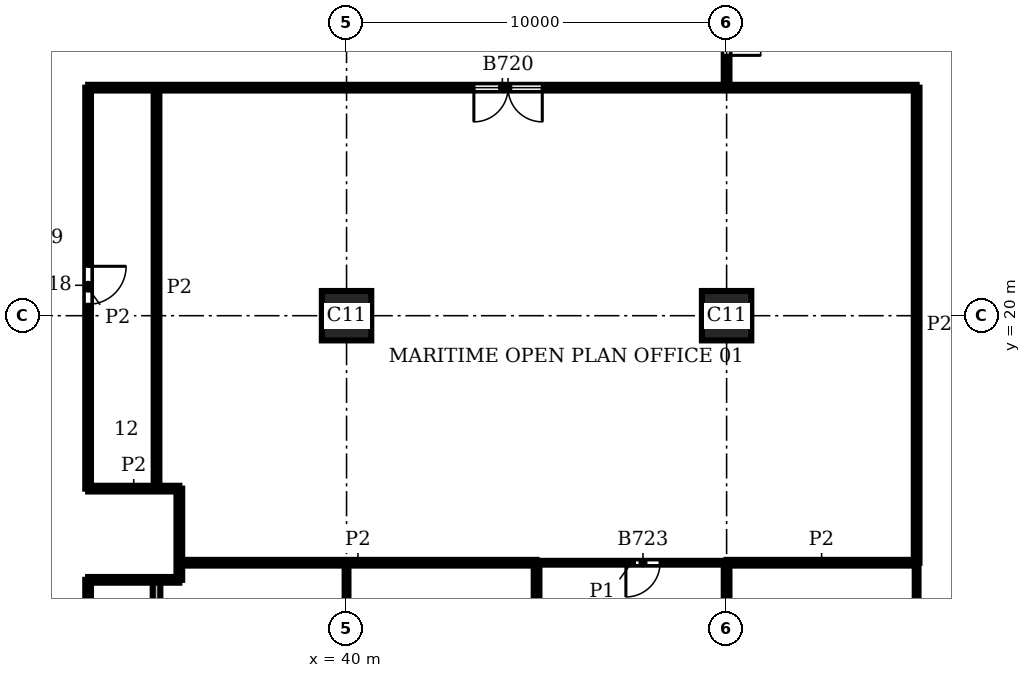
"""IFC4 building model, lengths in metres.
Left out: names, types, materials, properties, quantities, classifications, styles, units other than length and angle.
Written with IfcOpenShell. Run it as: python <this file> out.ifc"""

import sys

from ifc_helpers import new_model, si_unit, direction, frame, frame_2d, origin, origin_2d, place, context, subcontext, project, spatial, rectangle, extrude, element, fill, save


model = new_model("IFC4")
c1 = context("Model", 3, precision=1e-05, world=origin(), true_north=direction((0.0, 1.0)))
c2 = subcontext(c1, "Body", "Model", "MODEL_VIEW")
j1 = project(units=[si_unit("LENGTHUNIT", "METRE"), si_unit("PLANEANGLEUNIT", "RADIAN")], contexts=[c1])
p1 = place(None, origin())
s1 = spatial("IfcSite", under=j1, at=p1, CompositionType="ELEMENT")
p2 = place(p1, origin())
s2 = spatial("IfcBuilding", under=s1, at=p2, CompositionType="ELEMENT")
p3 = place(p2, frame((0.0, 0.0, 201.9)))
s3 = spatial("IfcBuildingStorey", under=s2, at=p3, CompositionType="ELEMENT", Elevation=201.9)
for number, where, z_axis, x_axis in (
    (1, (40.0, 20.0, 0.0), (0.0, 0.0, 1.0), (1.0, 0.0, 0.0)),
    (2, (50.0, 20.0, 0.0), (0.0, 0.0, 1.0), (1.0, 0.0, 0.0)),
):
    element("IfcColumn", number, at=place(p3, frame(where, z_axis=z_axis, x_axis=x_axis)), inside=s3, PredefinedType="COLUMN", context=c2, shape_type="SweptSolid", body=[
        extrude(rectangle(XDim=1.3, YDim=1.3, at=origin_2d()), origin(), (0.0, 0.0, 1.0), 3.9),
    ])
p4 = place(p3, frame((40.0, 10.65, 0.0), z_axis=(0.0, 0.0, 1.0), x_axis=(0.0, 1.0, 0.0)))
e3 = element("IfcWall", 3, at=p4, inside=s3, PredefinedType="PARTITIONING", context=c2, shape_type="SweptSolid", body=[
    extrude(rectangle(XDim=2.85, YDim=0.1, at=frame_2d((1.425, 0.0))), origin(), (0.0, 0.0, 1.0), 3.58),
])
p5 = place(p3, frame((55.0, 6.0, 0.0), z_axis=(0.0, 0.0, 1.0), x_axis=(0.0, 1.0, 0.0)))
e4 = element("IfcWall", 4, at=p5, inside=s3, PredefinedType="PARTITIONING", context=c2, shape_type="SweptSolid", body=[
    extrude(rectangle(XDim=7.5, YDim=0.1, at=frame_2d((3.75, 0.0))), origin(), (0.0, 0.0, 1.0), 3.58),
])
p6 = place(p5, frame((3.825, 0.0, 0.0)))
e5 = element("IfcOpeningElement", 5, at=p6, cuts=e4, PredefinedType="OPENING", context=c2, shape_type="SweptSolid", body=[
    extrude(rectangle(XDim=0.95, YDim=2.1, at=frame_2d((0.475, 1.05))), frame((0.0, 0.06, 0.0), z_axis=(0.0, -1.0, 0.0), x_axis=(1.0, 0.0, 0.0)), (0.0, 0.0, 1.0), 0.12),
])
p7 = place(p3, frame((45.0, 13.5, 0.0), z_axis=(0.0, 0.0, 1.0), x_axis=(1.0, 0.0, 0.0)))
e6 = element("IfcWall", 6, at=p7, inside=s3, PredefinedType="PARTITIONING", context=c2, shape_type="SweptSolid", body=[
    extrude(rectangle(XDim=5.0, YDim=0.1, at=frame_2d((2.5, 0.0))), origin(), (0.0, 0.0, 1.0), 3.58),
])
p8 = place(p7, frame((2.35, 0.0, 0.0)))
e7 = element("IfcOpeningElement", 7, at=p8, cuts=e6, PredefinedType="OPENING", context=c2, shape_type="SweptSolid", body=[
    extrude(rectangle(XDim=0.9, YDim=2.1, at=frame_2d((0.45, 1.05))), frame((0.0, 0.06, 0.0), z_axis=(0.0, -1.0, 0.0), x_axis=(1.0, 0.0, 0.0)), (0.0, 0.0, 1.0), 0.12),
])
p9 = place(p3, frame((33.2, 8.0, 0.0), z_axis=(0.0, 0.0, 1.0), x_axis=(0.0, 1.0, 0.0)))
e8 = element("IfcWall", 8, at=p9, inside=s3, PredefinedType="PARTITIONING", context=c2, shape_type="SweptSolid", body=[
    extrude(rectangle(XDim=5.05, YDim=0.15, at=frame_2d((2.525, 0.0))), origin(), (0.0, 0.0, 1.0), 3.58),
])
p10 = place(p3, frame((33.2, 15.45, 0.0), z_axis=(0.0, 0.0, 1.0), x_axis=(0.0, 1.0, 0.0)))
e9 = element("IfcWall", 9, at=p10, inside=s3, PredefinedType="PARTITIONING", context=c2, shape_type="SweptSolid", body=[
    extrude(rectangle(XDim=10.55, YDim=0.15, at=frame_2d((5.275, 0.0))), origin(), (0.0, 0.0, 1.0), 3.58),
])
p11 = place(p10, frame((4.85, 0.0, 0.0)))
e10 = element("IfcOpeningElement", 10, at=p11, cuts=e9, PredefinedType="OPENING", context=c2, shape_type="SweptSolid", body=[
    extrude(rectangle(XDim=1.0, YDim=2.1, at=frame_2d((0.5, 1.05))), frame((0.0, 0.085, 0.0), z_axis=(0.0, -1.0, 0.0), x_axis=(1.0, 0.0, 0.0)), (0.0, 0.0, 1.0), 0.17),
])
p12 = place(p3, frame((35.0, 15.45, 0.0), z_axis=(0.0, 0.0, 1.0), x_axis=(0.0, 1.0, 0.0)))
e11 = element("IfcWall", 11, at=p12, inside=s3, PredefinedType="PARTITIONING", context=c2, shape_type="SweptSolid", body=[
    extrude(rectangle(XDim=10.55, YDim=0.15, at=frame_2d((5.275, 0.0))), origin(), (0.0, 0.0, 1.0), 3.58),
])
p13 = place(p3, frame((35.6, 13.05, 0.0), z_axis=(0.0, 0.0, 1.0), x_axis=(0.0, 1.0, 0.0)))
e12 = element("IfcWall", 12, at=p13, inside=s3, PredefinedType="PARTITIONING", context=c2, shape_type="SweptSolid", body=[
    extrude(rectangle(XDim=2.4, YDim=0.15, at=frame_2d((1.2, 0.0))), origin(), (0.0, 0.0, 1.0), 3.58),
])
p14 = place(p3, frame((45.0, 6.0, 0.0), z_axis=(0.0, 0.0, 1.0), x_axis=(0.0, 1.0, 0.0)))
e13 = element("IfcWall", 13, at=p14, inside=s3, PredefinedType="PARTITIONING", context=c2, shape_type="SweptSolid", body=[
    extrude(rectangle(XDim=7.5, YDim=0.15, at=frame_2d((3.75, 0.0))), origin(), (0.0, 0.0, 1.0), 3.58),
])
p15 = place(p3, frame((50.0, 10.65, 0.0), z_axis=(0.0, 0.0, 1.0), x_axis=(0.0, 1.0, 0.0)))
e14 = element("IfcWall", 14, at=p15, inside=s3, PredefinedType="PARTITIONING", context=c2, shape_type="SweptSolid", body=[
    extrude(rectangle(XDim=2.85, YDim=0.15, at=frame_2d((1.425, 0.0))), origin(), (0.0, 0.0, 1.0), 3.58),
])
p16 = place(p3, frame((50.0, 26.0, 0.0), z_axis=(0.0, 0.0, 1.0), x_axis=(0.0, 1.0, 0.0)))
e15 = element("IfcWall", 15, at=p16, inside=s3, PredefinedType="PARTITIONING", context=c2, shape_type="SweptSolid", body=[
    extrude(rectangle(XDim=3.55, YDim=0.15, at=frame_2d((1.775, 0.0))), origin(), (0.0, 0.0, 1.0), 3.58),
])
p17 = place(p16, frame((0.85, 0.0, 0.0)))
e16 = element("IfcOpeningElement", 16, at=p17, cuts=e15, PredefinedType="OPENING", context=c2, shape_type="SweptSolid", body=[
    extrude(rectangle(XDim=1.8, YDim=2.1, at=frame_2d((0.9, 1.05))), frame((0.0, 0.085, 0.0), z_axis=(0.0, -1.0, 0.0), x_axis=(1.0, 0.0, 0.0)), (0.0, 0.0, 1.0), 0.17),
])
p18 = place(p3, frame((55.0, 13.5, 0.0), z_axis=(0.0, 0.0, 1.0), x_axis=(0.0, 1.0, 0.0)))
e17 = element("IfcWall", 17, at=p18, inside=s3, PredefinedType="PARTITIONING", context=c2, shape_type="SweptSolid", body=[
    extrude(rectangle(XDim=12.5, YDim=0.15, at=frame_2d((6.25, 0.0))), origin(), (0.0, 0.0, 1.0), 3.58),
])
p19 = place(p3, frame((33.2, 13.05, 0.0), z_axis=(0.0, 0.0, 1.0), x_axis=(1.0, 0.0, 0.0)))
e18 = element("IfcWall", 18, at=p19, inside=s3, PredefinedType="PARTITIONING", context=c2, shape_type="SweptSolid", body=[
    extrude(rectangle(XDim=2.4, YDim=0.15, at=frame_2d((1.2, 0.0))), origin(), (0.0, 0.0, 1.0), 3.58),
])
p20 = place(p3, frame((35.6, 13.5, 0.0), z_axis=(0.0, 0.0, 1.0), x_axis=(1.0, 0.0, 0.0)))
e19 = element("IfcWall", 19, at=p20, inside=s3, PredefinedType="PARTITIONING", context=c2, shape_type="SweptSolid", body=[
    extrude(rectangle(XDim=9.4, YDim=0.15, at=frame_2d((4.7, 0.0))), origin(), (0.0, 0.0, 1.0), 3.58),
])
p21 = place(p3, frame((50.0, 13.5, 0.0), z_axis=(0.0, 0.0, 1.0), x_axis=(1.0, 0.0, 0.0)))
e20 = element("IfcWall", 20, at=p21, inside=s3, PredefinedType="PARTITIONING", context=c2, shape_type="SweptSolid", body=[
    extrude(rectangle(XDim=5.0, YDim=0.15, at=frame_2d((2.5, 0.0))), origin(), (0.0, 0.0, 1.0), 3.58),
])
p22 = place(p3, frame((33.2, 15.45, 0.0), z_axis=(0.0, 0.0, 1.0), x_axis=(1.0, 0.0, 0.0)))
e21 = element("IfcWall", 21, at=p22, inside=s3, PredefinedType="PARTITIONING", context=c2, shape_type="SweptSolid", body=[
    extrude(rectangle(XDim=2.4, YDim=0.15, at=frame_2d((1.2, 0.0))), origin(), (0.0, 0.0, 1.0), 3.58),
])
p23 = place(p3, frame((33.2, 26.0, 0.0), z_axis=(0.0, 0.0, 1.0), x_axis=(1.0, 0.0, 0.0)))
e22 = element("IfcWall", 22, at=p23, inside=s3, PredefinedType="PARTITIONING", context=c2, shape_type="SweptSolid", body=[
    extrude(rectangle(XDim=21.8, YDim=0.15, at=frame_2d((10.9, 0.0))), origin(), (0.0, 0.0, 1.0), 3.58),
])
p24 = place(p23, frame((10.15, 0.0, 0.0)))
e23 = element("IfcOpeningElement", 23, at=p24, cuts=e22, PredefinedType="OPENING", context=c2, shape_type="SweptSolid", body=[
    extrude(rectangle(XDim=1.8, YDim=2.1, at=frame_2d((0.9, 1.05))), frame((0.0, 0.085, 0.0), z_axis=(0.0, -1.0, 0.0), x_axis=(1.0, 0.0, 0.0)), (0.0, 0.0, 1.0), 0.17),
])
p25 = place(p3, frame((35.0, 8.0, 0.0), z_axis=(0.0, 0.0, 1.0), x_axis=(0.0, 1.0, 0.0)))
e24 = element("IfcWall", 24, at=p25, inside=s3, PredefinedType="PARTITIONING", context=c2, shape_type="SweptSolid", body=[
    extrude(rectangle(XDim=5.05, YDim=0.2, at=frame_2d((2.525, 0.0))), origin(), (0.0, 0.0, 1.0), 3.58),
])
p26 = place(p25, frame((2.1, 0.0, 0.0)))
e25 = element("IfcOpeningElement", 25, at=p26, cuts=e24, PredefinedType="OPENING", context=c2, shape_type="SweptSolid", body=[
    extrude(rectangle(XDim=0.8, YDim=2.1, at=frame_2d((0.4, 1.05))), frame((0.0, 0.11, 0.0), z_axis=(0.0, -1.0, 0.0), x_axis=(1.0, 0.0, 0.0)), (0.0, 0.0, 1.0), 0.22),
])
p27 = place(p17, frame((1.8, 0.0, 0.0), z_axis=(0.0, 0.0, 1.0), x_axis=(-1.0, 0.0, 0.0)))
e26 = element("IfcDoor", 26, at=p27, inside=s3, OperationType="DOUBLE_DOOR_SINGLE_SWING", PredefinedType="DOOR", context=c2, shape_type="SweptSolid", body=[
    extrude(rectangle(XDim=1.8, YDim=2.1, at=frame_2d((0.9, 1.05))), frame((0.0, 0.025, 0.0), z_axis=(0.0, -1.0, 0.0), x_axis=(1.0, 0.0, 0.0)), (0.0, 0.0, 1.0), 0.05),
])
fill(e16, e26)
p28 = place(p11, frame((1.0, 0.0, 0.0), z_axis=(0.0, 0.0, 1.0), x_axis=(-1.0, 0.0, 0.0)))
e27 = element("IfcDoor", 27, at=p28, inside=s3, OperationType="SINGLE_SWING_LEFT", PredefinedType="DOOR", context=c2, shape_type="SweptSolid", body=[
    extrude(rectangle(XDim=1.0, YDim=2.1, at=frame_2d((0.5, 1.05))), frame((0.0, 0.025, 0.0), z_axis=(0.0, -1.0, 0.0), x_axis=(1.0, 0.0, 0.0)), (0.0, 0.0, 1.0), 0.05),
])
fill(e10, e27)
p29 = place(p24, frame((1.8, 0.0, 0.0), z_axis=(0.0, 0.0, 1.0), x_axis=(-1.0, 0.0, 0.0)))
e28 = element("IfcDoor", 28, at=p29, inside=s3, OperationType="DOUBLE_DOOR_SINGLE_SWING", PredefinedType="DOOR", context=c2, shape_type="SweptSolid", body=[
    extrude(rectangle(XDim=1.8, YDim=2.1, at=frame_2d((0.9, 1.05))), frame((0.0, 0.025, 0.0), z_axis=(0.0, -1.0, 0.0), x_axis=(1.0, 0.0, 0.0)), (0.0, 0.0, 1.0), 0.05),
])
fill(e23, e28)
p30 = place(p8, frame((0.9, 0.0, 0.0), z_axis=(0.0, 0.0, 1.0), x_axis=(-1.0, 0.0, 0.0)))
e29 = element("IfcDoor", 29, at=p30, inside=s3, OperationType="SINGLE_SWING_RIGHT", PredefinedType="DOOR", context=c2, shape_type="SweptSolid", body=[
    extrude(rectangle(XDim=0.9, YDim=2.1, at=frame_2d((0.45, 1.05))), frame((0.0, 0.025, 0.0), z_axis=(0.0, -1.0, 0.0), x_axis=(1.0, 0.0, 0.0)), (0.0, 0.0, 1.0), 0.05),
])
fill(e7, e29)
save(model, sys.argv[1])
